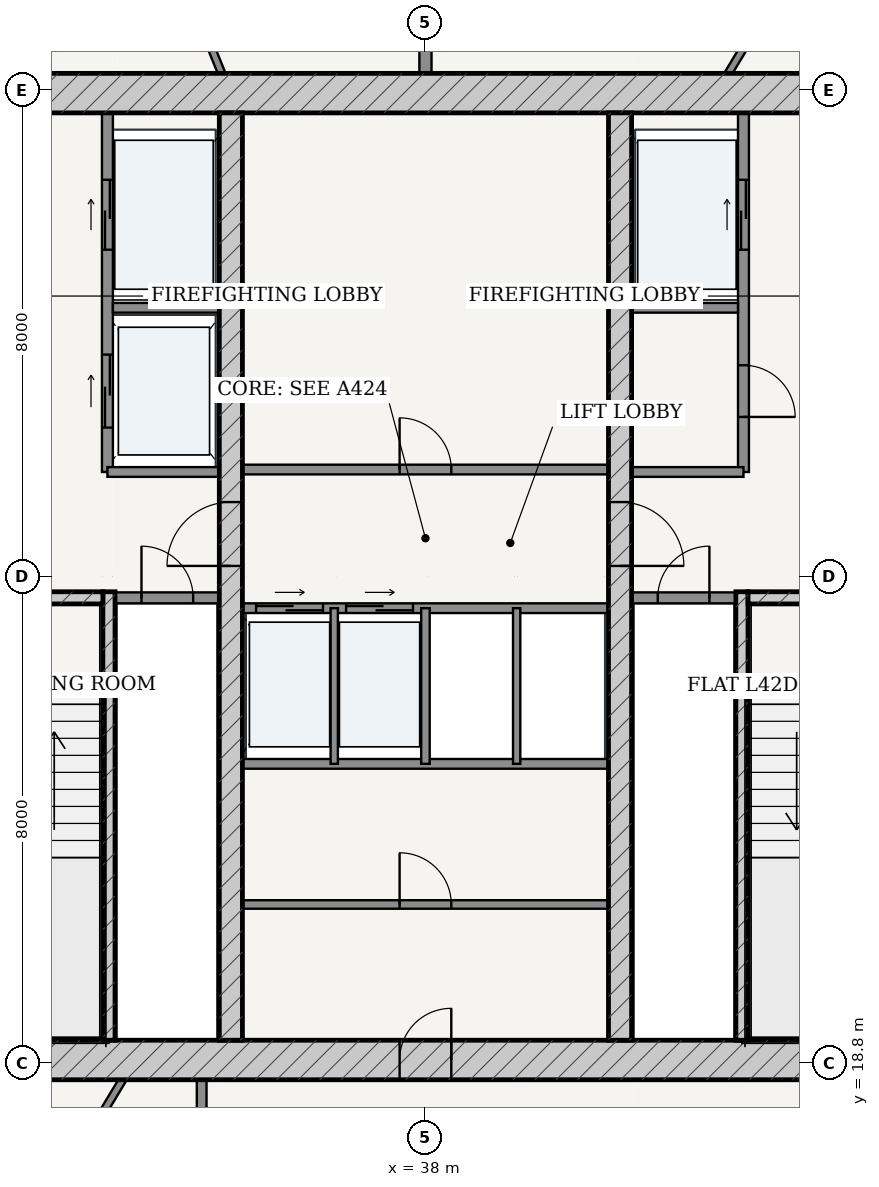
"""IFC4 building model, lengths in metres.
Left out: names, types, materials, properties, quantities, classifications, styles, units other than length and angle.
Written with IfcOpenShell. Run it as: python <this file> out.ifc"""

import sys

from ifc_helpers import new_model, si_unit, direction, frame, frame_2d, origin, place, context, subcontext, project, spatial, rectangle, extrude, source, transform, mapped, element, fill, save


model = new_model("IFC4")
c1 = context("Model", 3, precision=1e-05, world=origin(), true_north=direction((-0.2419218956, 0.970295726276)))
c2 = subcontext(c1, "Body", "Model", "MODEL_VIEW")
j1 = project(units=[si_unit("LENGTHUNIT", "METRE"), si_unit("PLANEANGLEUNIT", "RADIAN")], contexts=[c1])
p1 = place(None, origin())
s1 = spatial("IfcSite", under=j1, at=p1, CompositionType="ELEMENT")
p2 = place(p1, origin())
s2 = spatial("IfcBuilding", under=s1, at=p2, CompositionType="ELEMENT")
p3 = place(p2, frame((0.0, 0.0, 160.6)))
s3 = spatial("IfcBuildingStorey", under=s2, at=p3, CompositionType="ELEMENT", Elevation=160.6)
p4 = place(p3, frame((28.725, 18.85, 0.0), z_axis=(0.0, 0.0, 1.0), x_axis=(1.0, 0.0, 0.0)))
e1 = element("IfcWall", 1, at=p4, inside=s3, PredefinedType="SHEAR", context=c2, shape_type="SweptSolid", body=[
    extrude(rectangle(XDim=18.55, YDim=0.65, at=frame_2d((9.275, 0.0))), origin(), (0.0, 0.0, 1.0), 3.33),
])
p5 = place(p4, frame((8.85, 0.0, 0.0)))
e2 = element("IfcOpeningElement", 2, at=p5, cuts=e1, PredefinedType="OPENING", context=c2, shape_type="SweptSolid", body=[
    extrude(rectangle(XDim=0.85, YDim=2.1, at=frame_2d((0.425, 1.05))), frame((0.0, 0.335, 0.0), z_axis=(0.0, -1.0, 0.0), x_axis=(1.0, 0.0, 0.0)), (0.0, 0.0, 1.0), 0.67),
])
p6 = place(p3, frame((28.725, 34.75, 0.0), z_axis=(0.0, 0.0, 1.0), x_axis=(1.0, 0.0, 0.0)))
e3 = element("IfcWall", 3, at=p6, inside=s3, PredefinedType="SHEAR", context=c2, shape_type="SweptSolid", body=[
    extrude(rectangle(XDim=18.55, YDim=0.65, at=frame_2d((9.275, 0.0))), origin(), (0.0, 0.0, 1.0), 3.33),
])
p7 = place(p3, frame((32.795, 19.175, 0.0), z_axis=(0.0, 0.0, 1.0), x_axis=(0.0, 1.0, 0.0)))
e4 = element("IfcWall", 4, at=p7, inside=s3, PredefinedType="SOLIDWALL", context=c2, shape_type="SweptSolid", body=[
    extrude(rectangle(XDim=7.375, YDim=0.2, at=frame_2d((3.688, 0.0))), origin(), (0.0, 0.0, 1.0), 3.33),
])
p8 = place(p3, frame((29.375, 26.45, 0.0), z_axis=(0.0, 0.0, 1.0), x_axis=(1.0, 0.0, 0.0)))
e5 = element("IfcWall", 5, at=p8, inside=s3, PredefinedType="SOLIDWALL", context=c2, shape_type="SweptSolid", body=[
    extrude(rectangle(XDim=3.32, YDim=0.2, at=frame_2d((1.66, 0.0))), origin(), (0.0, 0.0, 1.0), 3.33),
])
p9 = place(p8, frame((1.185, 0.0, 0.0)))
e6 = element("IfcOpeningElement", 6, at=p9, cuts=e5, PredefinedType="OPENING", context=c2, shape_type="SweptSolid", body=[
    extrude(rectangle(XDim=0.95, YDim=2.15, at=frame_2d((0.475, 1.075))), frame((0.0, 0.11, 0.0), z_axis=(0.0, -1.0, 0.0), x_axis=(1.0, 0.0, 0.0)), (0.0, 0.0, 1.0), 0.22),
])
p10 = place(p3, frame((43.205, 19.175, 0.0), z_axis=(0.0, 0.0, 1.0), x_axis=(0.0, 1.0, 0.0)))
e7 = element("IfcWall", 7, at=p10, inside=s3, PredefinedType="SOLIDWALL", context=c2, shape_type="SweptSolid", body=[
    extrude(rectangle(XDim=7.375, YDim=0.2, at=frame_2d((3.688, 0.0))), origin(), (0.0, 0.0, 1.0), 3.33),
])
p11 = place(p3, frame((43.305, 26.45, 0.0), z_axis=(0.0, 0.0, 1.0), x_axis=(1.0, 0.0, 0.0)))
e8 = element("IfcWall", 8, at=p11, inside=s3, PredefinedType="SOLIDWALL", context=c2, shape_type="SweptSolid", body=[
    extrude(rectangle(XDim=3.32, YDim=0.2, at=frame_2d((1.66, 0.0))), origin(), (0.0, 0.0, 1.0), 3.33),
])
p12 = place(p11, frame((1.185, 0.0, 0.0)))
e9 = element("IfcOpeningElement", 9, at=p12, cuts=e8, PredefinedType="OPENING", context=c2, shape_type="SweptSolid", body=[
    extrude(rectangle(XDim=0.95, YDim=2.15, at=frame_2d((0.475, 1.075))), frame((0.0, 0.11, 0.0), z_axis=(0.0, -1.0, 0.0), x_axis=(1.0, 0.0, 0.0)), (0.0, 0.0, 1.0), 0.22),
])
p13 = place(p3, frame((34.8, 19.175, 0.0), z_axis=(0.0, 0.0, 1.0), x_axis=(0.0, 1.0, 0.0)))
e10 = element("IfcWall", 10, at=p13, inside=s3, PredefinedType="SHEAR", context=c2, shape_type="SweptSolid", body=[
    extrude(rectangle(XDim=15.25, YDim=0.38, at=frame_2d((7.625, 0.0))), origin(), (0.0, 0.0, 1.0), 3.33),
])
p14 = place(p13, frame((7.8, 0.0, 0.0)))
e11 = element("IfcOpeningElement", 11, at=p14, cuts=e10, PredefinedType="OPENING", context=c2, shape_type="SweptSolid", body=[
    extrude(rectangle(XDim=1.05, YDim=2.15, at=frame_2d((0.525, 1.075))), frame((0.0, 0.2, 0.0), z_axis=(0.0, -1.0, 0.0), x_axis=(1.0, 0.0, 0.0)), (0.0, 0.0, 1.0), 0.4),
])
p15 = place(p3, frame((41.2, 19.175, 0.0), z_axis=(0.0, 0.0, 1.0), x_axis=(0.0, 1.0, 0.0)))
e12 = element("IfcWall", 12, at=p15, inside=s3, PredefinedType="SHEAR", context=c2, shape_type="SweptSolid", body=[
    extrude(rectangle(XDim=15.25, YDim=0.38, at=frame_2d((7.625, 0.0))), origin(), (0.0, 0.0, 1.0), 3.33),
])
p16 = place(p15, frame((7.8, 0.0, 0.0)))
e13 = element("IfcOpeningElement", 13, at=p16, cuts=e12, PredefinedType="OPENING", context=c2, shape_type="SweptSolid", body=[
    extrude(rectangle(XDim=1.05, YDim=2.15, at=frame_2d((0.525, 1.075))), frame((0.0, 0.2, 0.0), z_axis=(0.0, -1.0, 0.0), x_axis=(1.0, 0.0, 0.0)), (0.0, 0.0, 1.0), 0.4),
])
p17 = place(p3, frame((32.9, 26.45, 0.0), z_axis=(0.0, 0.0, 1.0), x_axis=(1.0, 0.0, 0.0)))
e14 = element("IfcWall", 14, at=p17, inside=s3, PredefinedType="PARTITIONING", context=c2, shape_type="SweptSolid", body=[
    extrude(rectangle(XDim=1.71, YDim=0.18, at=frame_2d((0.855, 0.0))), origin(), (0.0, 0.0, 1.0), 3.33),
])
p18 = place(p17, frame((0.43, 0.0, 0.0)))
e15 = element("IfcOpeningElement", 15, at=p18, cuts=e14, PredefinedType="OPENING", context=c2, shape_type="SweptSolid", body=[
    extrude(rectangle(XDim=0.85, YDim=2.1, at=frame_2d((0.425, 1.05))), frame((0.0, 0.1, 0.0), z_axis=(0.0, -1.0, 0.0), x_axis=(1.0, 0.0, 0.0)), (0.0, 0.0, 1.0), 0.2),
])
p19 = place(p3, frame((41.39, 26.45, 0.0), z_axis=(0.0, 0.0, 1.0), x_axis=(1.0, 0.0, 0.0)))
e16 = element("IfcWall", 16, at=p19, inside=s3, PredefinedType="PARTITIONING", context=c2, shape_type="SweptSolid", body=[
    extrude(rectangle(XDim=1.71, YDim=0.18, at=frame_2d((0.855, 0.0))), origin(), (0.0, 0.0, 1.0), 3.33),
])
p20 = place(p19, frame((0.43, 0.0, 0.0)))
e17 = element("IfcOpeningElement", 17, at=p20, cuts=e16, PredefinedType="OPENING", context=c2, shape_type="SweptSolid", body=[
    extrude(rectangle(XDim=0.85, YDim=2.1, at=frame_2d((0.425, 1.05))), frame((0.0, 0.1, 0.0), z_axis=(0.0, -1.0, 0.0), x_axis=(1.0, 0.0, 0.0)), (0.0, 0.0, 1.0), 0.2),
])
p21 = place(p3, frame((32.77, 28.52, 0.0), z_axis=(0.0, 0.0, 1.0), x_axis=(0.0, 1.0, 0.0)))
e18 = element("IfcWall", 18, at=p21, inside=s3, PredefinedType="PARTITIONING", context=c2, shape_type="SweptSolid", body=[
    extrude(rectangle(XDim=5.905, YDim=0.18, at=frame_2d((2.953, 0.0))), origin(), (0.0, 0.0, 1.0), 3.33),
])
p22 = place(p21, frame((3.655, 0.0, 0.0)))
e19 = element("IfcOpeningElement", 19, at=p22, cuts=e18, PredefinedType="OPENING", context=c2, shape_type="SweptSolid", body=[
    extrude(rectangle(XDim=1.15, YDim=2.2, at=frame_2d((0.575, 1.1))), frame((0.0, 0.1, 0.0), z_axis=(0.0, -1.0, 0.0), x_axis=(1.0, 0.0, 0.0)), (0.0, 0.0, 1.0), 0.2),
])
p23 = place(p21, frame((0.73, 0.0, 0.0)))
e20 = element("IfcOpeningElement", 20, at=p23, cuts=e18, PredefinedType="OPENING", context=c2, shape_type="SweptSolid", body=[
    extrude(rectangle(XDim=1.2, YDim=2.25, at=frame_2d((0.6, 1.125))), frame((0.0, 0.1, 0.0), z_axis=(0.0, -1.0, 0.0), x_axis=(1.0, 0.0, 0.0)), (0.0, 0.0, 1.0), 0.2),
])
p24 = place(p3, frame((32.86, 31.22, 0.0), z_axis=(0.0, 0.0, 1.0), x_axis=(1.0, 0.0, 0.0)))
e21 = element("IfcWall", 21, at=p24, inside=s3, PredefinedType="PARTITIONING", context=c2, shape_type="SweptSolid", body=[
    extrude(rectangle(XDim=1.75, YDim=0.16, at=frame_2d((0.875, 0.0))), origin(), (0.0, 0.0, 1.0), 3.33),
])
p25 = place(p3, frame((32.77, 28.52, 0.0), z_axis=(0.0, 0.0, 1.0), x_axis=(1.0, 0.0, 0.0)))
e22 = element("IfcWall", 22, at=p25, inside=s3, PredefinedType="PARTITIONING", context=c2, shape_type="SweptSolid", body=[
    extrude(rectangle(XDim=1.84, YDim=0.16, at=frame_2d((0.92, 0.0))), origin(), (0.0, 0.0, 1.0), 3.33),
])
p26 = place(p3, frame((43.23, 28.52, 0.0), z_axis=(0.0, 0.0, 1.0), x_axis=(0.0, 1.0, 0.0)))
e23 = element("IfcWall", 23, at=p26, inside=s3, PredefinedType="PARTITIONING", context=c2, shape_type="SweptSolid", body=[
    extrude(rectangle(XDim=5.905, YDim=0.18, at=frame_2d((2.953, 0.0))), origin(), (0.0, 0.0, 1.0), 3.33),
])
p27 = place(p26, frame((0.905, 0.0, 0.0)))
e24 = element("IfcOpeningElement", 24, at=p27, cuts=e23, PredefinedType="OPENING", context=c2, shape_type="SweptSolid", body=[
    extrude(rectangle(XDim=0.85, YDim=2.1, at=frame_2d((0.425, 1.05))), frame((0.0, 0.1, 0.0), z_axis=(0.0, -1.0, 0.0), x_axis=(1.0, 0.0, 0.0)), (0.0, 0.0, 1.0), 0.2),
])
p28 = place(p26, frame((3.655, 0.0, 0.0)))
e25 = element("IfcOpeningElement", 25, at=p28, cuts=e23, PredefinedType="OPENING", context=c2, shape_type="SweptSolid", body=[
    extrude(rectangle(XDim=1.15, YDim=2.2, at=frame_2d((0.575, 1.1))), frame((0.0, 0.1, 0.0), z_axis=(0.0, -1.0, 0.0), x_axis=(1.0, 0.0, 0.0)), (0.0, 0.0, 1.0), 0.2),
])
p29 = place(p3, frame((41.39, 31.22, 0.0), z_axis=(0.0, 0.0, 1.0), x_axis=(1.0, 0.0, 0.0)))
e26 = element("IfcWall", 26, at=p29, inside=s3, PredefinedType="PARTITIONING", context=c2, shape_type="SweptSolid", body=[
    extrude(rectangle(XDim=1.75, YDim=0.16, at=frame_2d((0.875, 0.0))), origin(), (0.0, 0.0, 1.0), 3.33),
])
p30 = place(p3, frame((41.39, 28.52, 0.0), z_axis=(0.0, 0.0, 1.0), x_axis=(1.0, 0.0, 0.0)))
e27 = element("IfcWall", 27, at=p30, inside=s3, PredefinedType="PARTITIONING", context=c2, shape_type="SweptSolid", body=[
    extrude(rectangle(XDim=1.84, YDim=0.16, at=frame_2d((0.92, 0.0))), origin(), (0.0, 0.0, 1.0), 3.33),
])
p31 = place(p3, frame((34.99, 28.56, 0.0), z_axis=(0.0, 0.0, 1.0), x_axis=(1.0, 0.0, 0.0)))
e28 = element("IfcWall", 28, at=p31, inside=s3, PredefinedType="PARTITIONING", context=c2, shape_type="SweptSolid", body=[
    extrude(rectangle(XDim=6.02, YDim=0.16, at=frame_2d((3.01, 0.0))), origin(), (0.0, 0.0, 1.0), 3.33),
])
p32 = place(p31, frame((2.585, 0.0, 0.0)))
e29 = element("IfcOpeningElement", 29, at=p32, cuts=e28, PredefinedType="OPENING", context=c2, shape_type="SweptSolid", body=[
    extrude(rectangle(XDim=0.85, YDim=2.1, at=frame_2d((0.425, 1.05))), frame((0.0, 0.09, 0.0), z_axis=(0.0, -1.0, 0.0), x_axis=(1.0, 0.0, 0.0)), (0.0, 0.0, 1.0), 0.18),
])
p33 = place(p3, frame((34.99, 26.28, 0.0), z_axis=(0.0, 0.0, 1.0), x_axis=(1.0, 0.0, 0.0)))
e30 = element("IfcWall", 30, at=p33, inside=s3, PredefinedType="PARTITIONING", context=c2, shape_type="SweptSolid", body=[
    extrude(rectangle(XDim=6.02, YDim=0.16, at=frame_2d((3.01, 0.0))), origin(), (0.0, 0.0, 1.0), 3.33),
])
p34 = place(p33, frame((0.225, 0.0, 0.0)))
e31 = element("IfcOpeningElement", 31, at=p34, cuts=e30, PredefinedType="OPENING", context=c2, shape_type="SweptSolid", body=[
    extrude(rectangle(XDim=1.1, YDim=2.2, at=frame_2d((0.55, 1.1))), frame((0.0, 0.09, 0.0), z_axis=(0.0, -1.0, 0.0), x_axis=(1.0, 0.0, 0.0)), (0.0, 0.0, 1.0), 0.18),
])
p35 = place(p33, frame((1.705, 0.0, 0.0)))
e32 = element("IfcOpeningElement", 32, at=p35, cuts=e30, PredefinedType="OPENING", context=c2, shape_type="SweptSolid", body=[
    extrude(rectangle(XDim=1.1, YDim=2.2, at=frame_2d((0.55, 1.1))), frame((0.0, 0.09, 0.0), z_axis=(0.0, -1.0, 0.0), x_axis=(1.0, 0.0, 0.0)), (0.0, 0.0, 1.0), 0.18),
])
p36 = place(p3, frame((34.99, 23.72, 0.0), z_axis=(0.0, 0.0, 1.0), x_axis=(1.0, 0.0, 0.0)))
e33 = element("IfcWall", 33, at=p36, inside=s3, PredefinedType="PARTITIONING", context=c2, shape_type="SweptSolid", body=[
    extrude(rectangle(XDim=6.02, YDim=0.16, at=frame_2d((3.01, 0.0))), origin(), (0.0, 0.0, 1.0), 3.33),
])
p37 = place(p3, frame((36.5, 23.72, 0.0), z_axis=(0.0, 0.0, 1.0), x_axis=(0.0, 1.0, 0.0)))
e34 = element("IfcWall", 34, at=p37, inside=s3, PredefinedType="PARTITIONING", context=c2, shape_type="SweptSolid", body=[
    extrude(rectangle(XDim=2.56, YDim=0.12, at=frame_2d((1.28, 0.0))), origin(), (0.0, 0.0, 1.0), 3.33),
])
p38 = place(p3, frame((38.0, 23.72, 0.0), z_axis=(0.0, 0.0, 1.0), x_axis=(0.0, 1.0, 0.0)))
e35 = element("IfcWall", 35, at=p38, inside=s3, PredefinedType="PARTITIONING", context=c2, shape_type="SweptSolid", body=[
    extrude(rectangle(XDim=2.56, YDim=0.14, at=frame_2d((1.28, 0.0))), origin(), (0.0, 0.0, 1.0), 3.33),
])
p39 = place(p3, frame((39.5, 23.72, 0.0), z_axis=(0.0, 0.0, 1.0), x_axis=(0.0, 1.0, 0.0)))
e36 = element("IfcWall", 36, at=p39, inside=s3, PredefinedType="PARTITIONING", context=c2, shape_type="SweptSolid", body=[
    extrude(rectangle(XDim=2.56, YDim=0.12, at=frame_2d((1.28, 0.0))), origin(), (0.0, 0.0, 1.0), 3.33),
])
p40 = place(p3, frame((34.99, 21.407, 0.0), z_axis=(0.0, 0.0, 1.0), x_axis=(1.0, 0.0, 0.0)))
e37 = element("IfcWall", 37, at=p40, inside=s3, PredefinedType="PARTITIONING", context=c2, shape_type="SweptSolid", body=[
    extrude(rectangle(XDim=6.02, YDim=0.14, at=frame_2d((3.01, 0.0))), origin(), (0.0, 0.0, 1.0), 3.33),
])
p41 = place(p40, frame((2.585, 0.0, 0.0)))
e38 = element("IfcOpeningElement", 38, at=p41, cuts=e37, PredefinedType="OPENING", context=c2, shape_type="SweptSolid", body=[
    extrude(rectangle(XDim=0.85, YDim=2.1, at=frame_2d((0.425, 1.05))), frame((0.0, 0.08, 0.0), z_axis=(0.0, -1.0, 0.0), x_axis=(1.0, 0.0, 0.0)), (0.0, 0.0, 1.0), 0.16),
])
p42 = place(p3, frame((34.32, 16.675, 0.0), z_axis=(0.0, 0.0, 1.0), x_axis=(0.0, 1.0, 0.0)))
e39 = element("IfcWall", 39, at=p42, inside=s3, PredefinedType="PARTITIONING", context=c2, shape_type="SweptSolid", body=[
    extrude(rectangle(XDim=1.85, YDim=0.16, at=frame_2d((0.925, 0.0))), origin(), (0.0, 0.0, 1.0), 3.33),
])
p43 = place(p3, frame((42.98, 35.075, 0.0), z_axis=(0.0, 0.0, 1.0), x_axis=(0.515686235332, 0.856777512946, 0.0)))
e40 = element("IfcWall", 40, at=p43, inside=s3, PredefinedType="PARTITIONING", context=c2, shape_type="SweptSolid", body=[
    extrude(rectangle(XDim=3.346, YDim=0.12, at=frame_2d((1.673, 0.0))), origin(), (0.0, 0.0, 1.0), 3.33),
])
p44 = place(p3, frame((38.0, 35.075, 0.0), z_axis=(0.0, 0.0, 1.0), x_axis=(0.0, 1.0, 0.0)))
e41 = element("IfcWall", 41, at=p44, inside=s3, PredefinedType="PARTITIONING", context=c2, shape_type="SweptSolid", body=[
    extrude(rectangle(XDim=12.465, YDim=0.2, at=frame_2d((6.232, 0.0))), origin(), (0.0, 0.0, 1.0), 2.415),
])
p45 = place(p3, frame((34.649, 35.075, 0.0), z_axis=(0.0, 0.0, 1.0), x_axis=(-0.37535719187, 0.926880239573, 0.0)))
e42 = element("IfcWall", 42, at=p45, inside=s3, PredefinedType="PARTITIONING", context=c2, shape_type="SweptSolid", body=[
    extrude(rectangle(XDim=2.916, YDim=0.12, at=frame_2d((1.458, 0.0))), origin(), (0.0, 0.0, 1.0), 3.33),
])
p46 = place(p45, frame((1.028, 0.0, 0.0)))
e43 = element("IfcOpeningElement", 43, at=p46, cuts=e42, PredefinedType="OPENING", context=c2, shape_type="SweptSolid", body=[
    extrude(rectangle(XDim=0.86, YDim=2.15, at=frame_2d((0.43, 1.075))), frame((0.0, 0.07, 0.0), z_axis=(0.0, -1.0, 0.0), x_axis=(1.0, 0.0, 0.0)), (0.0, 0.0, 1.0), 0.14),
])
p47 = place(p3, frame((33.02, 18.525, 0.0), z_axis=(0.0, 0.0, 1.0), x_axis=(-0.515677168, -0.856782970421, 0.0)))
e44 = element("IfcWall", 44, at=p47, inside=s3, PredefinedType="PARTITIONING", context=c2, shape_type="SweptSolid", body=[
    extrude(rectangle(XDim=3.159, YDim=0.12, at=frame_2d((1.58, 0.0))), origin(), (0.0, 0.0, 1.0), 3.33),
])
p48 = place(p47, frame((1.15, 0.0, 0.0)))
e45 = element("IfcOpeningElement", 45, at=p48, cuts=e44, PredefinedType="OPENING", context=c2, shape_type="SweptSolid", body=[
    extrude(rectangle(XDim=0.86, YDim=2.15, at=frame_2d((0.43, 1.075))), frame((0.0, 0.07, 0.0), z_axis=(0.0, -1.0, 0.0), x_axis=(1.0, 0.0, 0.0)), (0.0, 0.0, 1.0), 0.14),
])
m1 = source(origin(), c2, "Body", "SweptSolid", [
    extrude(rectangle(XDim=1.05, YDim=2.15, at=frame_2d((0.525, 1.075))), frame((0.0, 0.025, 0.0), z_axis=(0.0, -1.0, 0.0), x_axis=(1.0, 0.0, 0.0)), (0.0, 0.0, 1.0), 0.05),
])
p49 = place(p14, origin())
e46 = element("IfcDoor", 46, at=p49, inside=s3, OperationType="SINGLE_SWING_LEFT", PredefinedType="DOOR", context=c2, shape_type="MappedRepresentation", body=[
    mapped(m1, transform((0.0, 0.0, 0.0), scale=1.0)),
])
fill(e11, e46)
p50 = place(p16, frame((1.05, 0.0, 0.0), z_axis=(0.0, 0.0, 1.0), x_axis=(-1.0, 0.0, 0.0)))
e47 = element("IfcDoor", 47, at=p50, inside=s3, OperationType="SINGLE_SWING_RIGHT", PredefinedType="DOOR", context=c2, shape_type="MappedRepresentation", body=[
    mapped(m1, transform((0.0, 0.0, 0.0), scale=1.0)),
])
fill(e13, e47)
m2 = source(origin(), c2, "Body", "SweptSolid", [
    extrude(rectangle(XDim=0.85, YDim=2.1, at=frame_2d((0.425, 1.05))), frame((0.0, 0.025, 0.0), z_axis=(0.0, -1.0, 0.0), x_axis=(1.0, 0.0, 0.0)), (0.0, 0.0, 1.0), 0.05),
])
p51 = place(p18, origin())
e48 = element("IfcDoor", 48, at=p51, inside=s3, OperationType="SINGLE_SWING_LEFT", PredefinedType="DOOR", context=c2, shape_type="MappedRepresentation", body=[
    mapped(m2, transform((0.0, 0.0, 0.0), scale=1.0)),
])
fill(e15, e48)
p52 = place(p20, origin())
e49 = element("IfcDoor", 49, at=p52, inside=s3, OperationType="SINGLE_SWING_RIGHT", PredefinedType="DOOR", context=c2, shape_type="MappedRepresentation", body=[
    mapped(m2, transform((0.0, 0.0, 0.0), scale=1.0)),
])
fill(e17, e49)
p53 = place(p27, frame((0.85, 0.0, 0.0), z_axis=(0.0, 0.0, 1.0), x_axis=(-1.0, 0.0, 0.0)))
e50 = element("IfcDoor", 50, at=p53, inside=s3, OperationType="SINGLE_SWING_RIGHT", PredefinedType="DOOR", context=c2, shape_type="MappedRepresentation", body=[
    mapped(m2, transform((0.0, 0.0, 0.0), scale=1.0)),
])
fill(e24, e50)
p54 = place(p32, origin())
e51 = element("IfcDoor", 51, at=p54, inside=s3, OperationType="SINGLE_SWING_LEFT", PredefinedType="DOOR", context=c2, shape_type="MappedRepresentation", body=[
    mapped(m2, transform((0.0, 0.0, 0.0), scale=1.0)),
])
fill(e29, e51)
p55 = place(p5, origin())
e52 = element("IfcDoor", 52, at=p55, inside=s3, OperationType="SINGLE_SWING_RIGHT", PredefinedType="DOOR", context=c2, shape_type="MappedRepresentation", body=[
    mapped(m2, transform((0.0, 0.0, 0.0), scale=1.0)),
])
fill(e2, e52)
p56 = place(p41, origin())
e53 = element("IfcDoor", 53, at=p56, inside=s3, OperationType="SINGLE_SWING_LEFT", PredefinedType="DOOR", context=c2, shape_type="MappedRepresentation", body=[
    mapped(m2, transform((0.0, 0.0, 0.0), scale=1.0)),
])
fill(e38, e53)
m3 = source(origin(), c2, "Body", "SweptSolid", [
    extrude(rectangle(XDim=1.15, YDim=2.2, at=frame_2d((0.575, 1.1))), frame((0.0, 0.025, 0.0), z_axis=(0.0, -1.0, 0.0), x_axis=(1.0, 0.0, 0.0)), (0.0, 0.0, 1.0), 0.05),
])
p57 = place(p22, origin())
e54 = element("IfcDoor", 54, at=p57, inside=s3, OperationType="DOUBLE_DOOR_SLIDING", PredefinedType="DOOR", context=c2, shape_type="MappedRepresentation", body=[
    mapped(m3, transform((0.0, 0.0, 0.0), scale=1.0)),
])
fill(e19, e54)
p58 = place(p28, origin())
e55 = element("IfcDoor", 55, at=p58, inside=s3, OperationType="DOUBLE_DOOR_SLIDING", PredefinedType="DOOR", context=c2, shape_type="MappedRepresentation", body=[
    mapped(m3, transform((0.0, 0.0, 0.0), scale=1.0)),
])
fill(e25, e55)
m4 = source(origin(), c2, "Body", "SweptSolid", [
    extrude(rectangle(XDim=1.2, YDim=2.25, at=frame_2d((0.6, 1.125))), frame((0.0, 0.025, 0.0), z_axis=(0.0, -1.0, 0.0), x_axis=(1.0, 0.0, 0.0)), (0.0, 0.0, 1.0), 0.05),
])
p59 = place(p23, origin())
e56 = element("IfcDoor", 56, at=p59, inside=s3, OperationType="DOUBLE_DOOR_SLIDING", PredefinedType="DOOR", context=c2, shape_type="MappedRepresentation", body=[
    mapped(m4, transform((0.0, 0.0, 0.0), scale=1.0)),
])
fill(e20, e56)
m5 = source(origin(), c2, "Body", "SweptSolid", [
    extrude(rectangle(XDim=1.1, YDim=2.2, at=frame_2d((0.55, 1.1))), frame((0.0, 0.025, 0.0), z_axis=(0.0, -1.0, 0.0), x_axis=(1.0, 0.0, 0.0)), (0.0, 0.0, 1.0), 0.05),
])
p60 = place(p34, origin())
e57 = element("IfcDoor", 57, at=p60, inside=s3, OperationType="DOUBLE_DOOR_SLIDING", PredefinedType="DOOR", context=c2, shape_type="MappedRepresentation", body=[
    mapped(m5, transform((0.0, 0.0, 0.0), scale=1.0)),
])
fill(e31, e57)
p61 = place(p35, origin())
e58 = element("IfcDoor", 58, at=p61, inside=s3, OperationType="DOUBLE_DOOR_SLIDING", PredefinedType="DOOR", context=c2, shape_type="MappedRepresentation", body=[
    mapped(m5, transform((0.0, 0.0, 0.0), scale=1.0)),
])
fill(e32, e58)
save(model, sys.argv[1])
